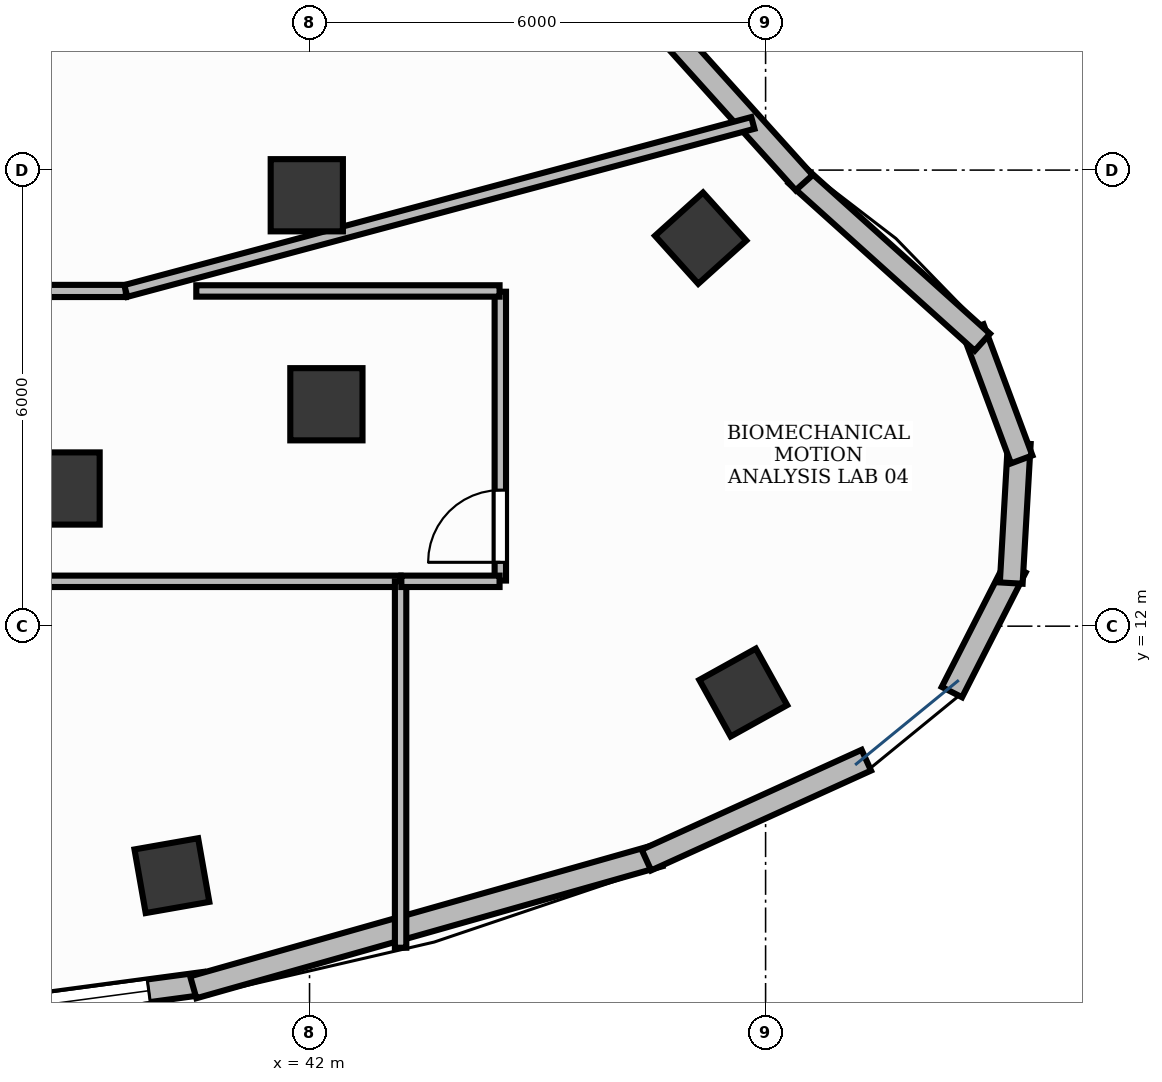
"""IFC4 building model, lengths in metres.
Left out: names, types, materials, properties, quantities, classifications, styles, units other than length and angle.
Written with IfcOpenShell. Run it as: python <this file> out.ifc"""

import sys

from ifc_helpers import new_model, si_unit, direction, frame, frame_2d, origin, origin_2d, place, context, subcontext, project, spatial, rectangle, extrude, element, fill, save


model = new_model("IFC4")
c1 = context("Model", 3, precision=1e-05, world=origin(), true_north=direction((0.0, 1.0)))
c2 = subcontext(c1, "Body", "Model", "MODEL_VIEW")
j1 = project(units=[si_unit("LENGTHUNIT", "METRE"), si_unit("PLANEANGLEUNIT", "RADIAN")], contexts=[c1])
p1 = place(None, origin())
s1 = spatial("IfcSite", under=j1, at=p1, CompositionType="ELEMENT")
p2 = place(p1, origin())
s2 = spatial("IfcBuilding", under=s1, at=p2, CompositionType="ELEMENT")
p3 = place(p2, frame((0.0, 0.0, 273.0)))
s3 = spatial("IfcBuildingStorey", under=s2, at=p3, CompositionType="ELEMENT", Elevation=273.0)
p4 = place(p3, frame((40.189, 8.718, -0.0), z_axis=(0.0, 0.0, 1.0), x_axis=(0.984868307662, 0.173304404339, 0.0)))
e1 = element("IfcColumn", 1, at=p4, inside=s3, PredefinedType="COLUMN", context=c2, shape_type="SweptSolid", body=[
    extrude(rectangle(XDim=0.85, YDim=0.85, at=origin_2d()), origin(), (0.0, 0.0, 1.0), 3.881),
])
p5 = place(p3, frame((38.764, 13.811, -0.0), z_axis=(0.0, 0.0, 1.0), x_axis=(1.0, 0.0, 0.0)))
e2 = element("IfcColumn", 2, at=p5, inside=s3, PredefinedType="COLUMN", context=c2, shape_type="SweptSolid", body=[
    extrude(rectangle(XDim=0.95, YDim=0.95, at=origin_2d()), origin(), (0.0, 0.0, 1.0), 3.881),
])
p6 = place(p3, frame((47.706, 11.127, -0.0), z_axis=(0.0, 0.0, 1.0), x_axis=(0.874535078577, 0.484962262797, 0.0)))
e3 = element("IfcColumn", 3, at=p6, inside=s3, PredefinedType="COLUMN", context=c2, shape_type="SweptSolid", body=[
    extrude(rectangle(XDim=0.85, YDim=0.85, at=origin_2d()), origin(), (0.0, 0.0, 1.0), 3.881),
])
p7 = place(p3, frame((42.222, 14.919, -0.0), z_axis=(0.0, 0.0, 1.0), x_axis=(1.0, 0.0, 0.0)))
e4 = element("IfcColumn", 4, at=p7, inside=s3, PredefinedType="COLUMN", context=c2, shape_type="SweptSolid", body=[
    extrude(rectangle(XDim=0.95, YDim=0.95, at=origin_2d()), origin(), (0.0, 0.0, 1.0), 3.881),
])
p8 = place(p3, frame((47.146, 17.104, -0.0), z_axis=(0.0, 0.0, 1.0), x_axis=(-0.669130606359, 0.743144825477, 0.0)))
e5 = element("IfcColumn", 5, at=p8, inside=s3, PredefinedType="COLUMN", context=c2, shape_type="SweptSolid", body=[
    extrude(rectangle(XDim=0.85, YDim=0.85, at=origin_2d()), origin(), (0.0, 0.0, 1.0), 3.881),
])
p9 = place(p3, frame((41.964, 17.669, -0.0), z_axis=(0.0, 0.0, 1.0), x_axis=(1.0, 0.0, 0.0)))
e6 = element("IfcColumn", 6, at=p9, inside=s3, PredefinedType="COLUMN", context=c2, shape_type="SweptSolid", body=[
    extrude(rectangle(XDim=0.95, YDim=0.95, at=origin_2d()), origin(), (0.0, 0.0, 1.0), 3.881),
])
p10 = place(p3, frame((37.362, 6.865, 0.0), z_axis=(0.0, 0.0, 1.0), x_axis=(0.991126551491, 0.132921627022, 0.0)))
e7 = element("IfcWall", 7, at=p10, inside=s3, PredefinedType="STANDARD", context=c2, shape_type="SweptSolid", body=[
    extrude(rectangle(XDim=3.292, YDim=0.3, at=frame_2d((1.646, 0.0))), origin(), (0.0, 0.0, 1.0), 3.88),
])
p11 = place(p10, frame((0.746, 0.0, 0.9)))
e8 = element("IfcOpeningElement", 8, at=p11, cuts=e7, PredefinedType="OPENING", context=c2, shape_type="SweptSolid", body=[
    extrude(rectangle(XDim=1.8, YDim=2.1, at=frame_2d((0.9, 1.05))), frame((0.0, 0.165, 0.0), z_axis=(0.0, -1.0, 0.0), x_axis=(1.0, 0.0, 0.0)), (0.0, 0.0, 1.0), 0.33),
])
p12 = place(p3, frame((40.47, 7.249, 0.0), z_axis=(0.0, 0.0, 1.0), x_axis=(0.962160382219, 0.272483758943, 0.0)))
e9 = element("IfcWall", 9, at=p12, inside=s3, PredefinedType="STANDARD", context=c2, shape_type="SweptSolid", body=[
    extrude(rectangle(XDim=6.372, YDim=0.3, at=frame_2d((3.186, 0.0))), origin(), (0.0, 0.0, 1.0), 3.88),
])
p13 = place(p3, frame((46.432, 8.923, 0.0), z_axis=(0.0, 0.0, 1.0), x_axis=(0.910592641424, 0.413305022211, 0.0)))
e10 = element("IfcWall", 10, at=p13, inside=s3, PredefinedType="STANDARD", context=c2, shape_type="SweptSolid", body=[
    extrude(rectangle(XDim=3.177, YDim=0.3, at=frame_2d((1.589, 0.0))), origin(), (0.0, 0.0, 1.0), 3.88),
])
for number, where, z_axis, x_axis in (
    (11, (50.451, 11.133, 0.0), (0.0, 0.0, 1.0), (0.454, 0.891, 0.0)),
    (12, (51.232, 12.567, 0.0), (0.0, 0.0, 1.0), (0.057, 0.998, 0.0)),
    (13, (51.369, 14.194, 0.0), (0.0, 0.0, 1.0), (-0.349, 0.937, 0.0)),
):
    element("IfcWall", number, at=place(p3, frame(where, z_axis=z_axis, x_axis=x_axis)), inside=s3, PredefinedType="STANDARD", context=c2, shape_type="SweptSolid", body=[
        extrude(rectangle(XDim=1.842, YDim=0.3, at=frame_2d((0.921, 0.0))), origin(), (0.0, 0.0, 1.0), 3.88),
    ])
p14 = place(p3, frame((50.852, 15.736, 0.0), z_axis=(0.0, 0.0, 1.0), x_axis=(-0.743397410822, 0.668849975393, 0.0)))
e14 = element("IfcWall", 14, at=p14, inside=s3, PredefinedType="STANDARD", context=c2, shape_type="SweptSolid", body=[
    extrude(rectangle(XDim=3.291, YDim=0.3, at=frame_2d((1.646, 0.0))), origin(), (0.0, 0.0, 1.0), 3.88),
])
p15 = place(p3, frame((48.508, 17.835, 0.0), z_axis=(0.0, 0.0, 1.0), x_axis=(-0.669127242861, 0.743147853971, 0.0)))
e15 = element("IfcWall", 15, at=p15, inside=s3, PredefinedType="STANDARD", context=c2, shape_type="SweptSolid", body=[
    extrude(rectangle(XDim=3.071, YDim=0.3, at=frame_2d((1.535, 0.0))), origin(), (0.0, 0.0, 1.0), 3.88),
])
p16 = place(p3, frame((30.314, 12.59, 0.0), z_axis=(0.0, 0.0, 1.0), x_axis=(1.0, 0.0, 0.0)))
e16 = element("IfcWall", 16, at=p16, inside=s3, PredefinedType="PARTITIONING", context=c2, shape_type="SweptSolid", body=[
    extrude(rectangle(XDim=12.884, YDim=0.15, at=frame_2d((6.442, 0.0))), origin(), (0.0, 0.0, 1.0), 2.89),
])
p17 = place(p16, frame((0.24, 0.0, 0.0)))
e17 = element("IfcOpeningElement", 17, at=p17, cuts=e16, PredefinedType="OPENING", context=c2, shape_type="SweptSolid", body=[
    extrude(rectangle(XDim=0.95, YDim=2.15, at=frame_2d((0.475, 1.075))), frame((0.0, 0.09, 0.0), z_axis=(0.0, -1.0, 0.0), x_axis=(1.0, 0.0, 0.0)), (0.0, 0.0, 1.0), 0.18),
])
p18 = place(p3, frame((39.583, 16.41, 0.0), z_axis=(0.0, 0.0, 1.0), x_axis=(-1.0, 0.0, 0.0)))
e18 = element("IfcWall", 18, at=p18, inside=s3, PredefinedType="PARTITIONING", context=c2, shape_type="SweptSolid", body=[
    extrude(rectangle(XDim=10.583, YDim=0.16, at=frame_2d((5.292, 0.0))), origin(), (0.0, 0.0, 1.0), 2.89),
])
p19 = place(p18, frame((5.237, 0.0, 0.0)))
e19 = element("IfcOpeningElement", 19, at=p19, cuts=e18, PredefinedType="OPENING", context=c2, shape_type="SweptSolid", body=[
    extrude(rectangle(XDim=0.95, YDim=2.15, at=frame_2d((0.475, 1.075))), frame((0.0, 0.095, 0.0), z_axis=(0.0, -1.0, 0.0), x_axis=(1.0, 0.0, 0.0)), (0.0, 0.0, 1.0), 0.19),
])
p20 = place(p3, frame((44.51, 12.6, 0.0), z_axis=(0.0, 0.0, 1.0), x_axis=(0.0, 1.0, 0.0)))
e20 = element("IfcWall", 20, at=p20, inside=s3, PredefinedType="PARTITIONING", context=c2, shape_type="SweptSolid", body=[
    extrude(rectangle(XDim=3.8, YDim=0.15, at=frame_2d((1.9, 0.0))), origin(), (0.0, 0.0, 1.0), 2.89),
])
p21 = place(p20, frame((0.24, 0.0, 0.0)))
e21 = element("IfcOpeningElement", 21, at=p21, cuts=e20, PredefinedType="OPENING", context=c2, shape_type="SweptSolid", body=[
    extrude(rectangle(XDim=0.95, YDim=2.15, at=frame_2d((0.475, 1.075))), frame((0.0, 0.09, 0.0), z_axis=(0.0, -1.0, 0.0), x_axis=(1.0, 0.0, 0.0)), (0.0, 0.0, 1.0), 0.18),
])
p22 = place(p3, frame((43.198, 12.59, 0.0), z_axis=(0.0, 0.0, 1.0), x_axis=(0.0, -1.0, 0.0)))
e22 = element("IfcWall", 22, at=p22, inside=s3, PredefinedType="PARTITIONING", context=c2, shape_type="SweptSolid", body=[
    extrude(rectangle(XDim=4.821, YDim=0.15, at=frame_2d((2.41, 0.0))), origin(), (0.0, 0.0, 1.0), 2.89),
])
p23 = place(p3, frame((47.832, 18.62, 0.0), z_axis=(0.0, 0.0, 1.0), x_axis=(-0.965923934259, -0.258826106152, 0.0)))
e23 = element("IfcWall", 23, at=p23, inside=s3, PredefinedType="PARTITIONING", context=c2, shape_type="SweptSolid", body=[
    extrude(rectangle(XDim=8.54, YDim=0.16, at=frame_2d((4.27, 0.0))), origin(), (0.0, 0.0, 1.0), 2.89),
])
p24 = place(p3, frame((43.208, 12.59, 0.0), z_axis=(0.0, 0.0, 1.0), x_axis=(1.0, 0.0, 0.0)))
e24 = element("IfcWall", 24, at=p24, inside=s3, PredefinedType="PARTITIONING", context=c2, shape_type="SweptSolid", body=[
    extrude(rectangle(XDim=1.292, YDim=0.15, at=frame_2d((0.646, 0.0))), origin(), (0.0, 0.0, 1.0), 2.89),
])
p25 = place(p3, frame((44.5, 16.41, 0.0), z_axis=(0.0, 0.0, 1.0), x_axis=(-1.0, 0.0, 0.0)))
e25 = element("IfcWall", 25, at=p25, inside=s3, PredefinedType="PARTITIONING", context=c2, shape_type="SweptSolid", body=[
    extrude(rectangle(XDim=3.99, YDim=0.15, at=frame_2d((1.995, 0.0))), origin(), (0.0, 0.0, 1.0), 2.89),
])
p26 = place(p11, origin())
e26 = element("IfcWindow", 26, at=p26, inside=s3, PartitioningType="SINGLE_PANEL", PredefinedType="WINDOW", context=c2, shape_type="SweptSolid", body=[
    extrude(rectangle(XDim=1.8, YDim=2.1, at=frame_2d((0.9, 1.05))), frame((0.0, 0.03, 0.0), z_axis=(0.0, -1.0, 0.0), x_axis=(1.0, 0.0, 0.0)), (0.0, 0.0, 1.0), 0.06),
])
fill(e8, e26)
p27 = place(p21, origin())
e27 = element("IfcDoor", 27, at=p27, inside=s3, OperationType="SINGLE_SWING_LEFT", PredefinedType="DOOR", context=c2, shape_type="SweptSolid", body=[
    extrude(rectangle(XDim=0.95, YDim=2.15, at=frame_2d((0.475, 1.075))), frame((0.0, 0.025, 0.0), z_axis=(0.0, -1.0, 0.0), x_axis=(1.0, 0.0, 0.0)), (0.0, 0.0, 1.0), 0.05),
])
fill(e21, e27)
save(model, sys.argv[1])
